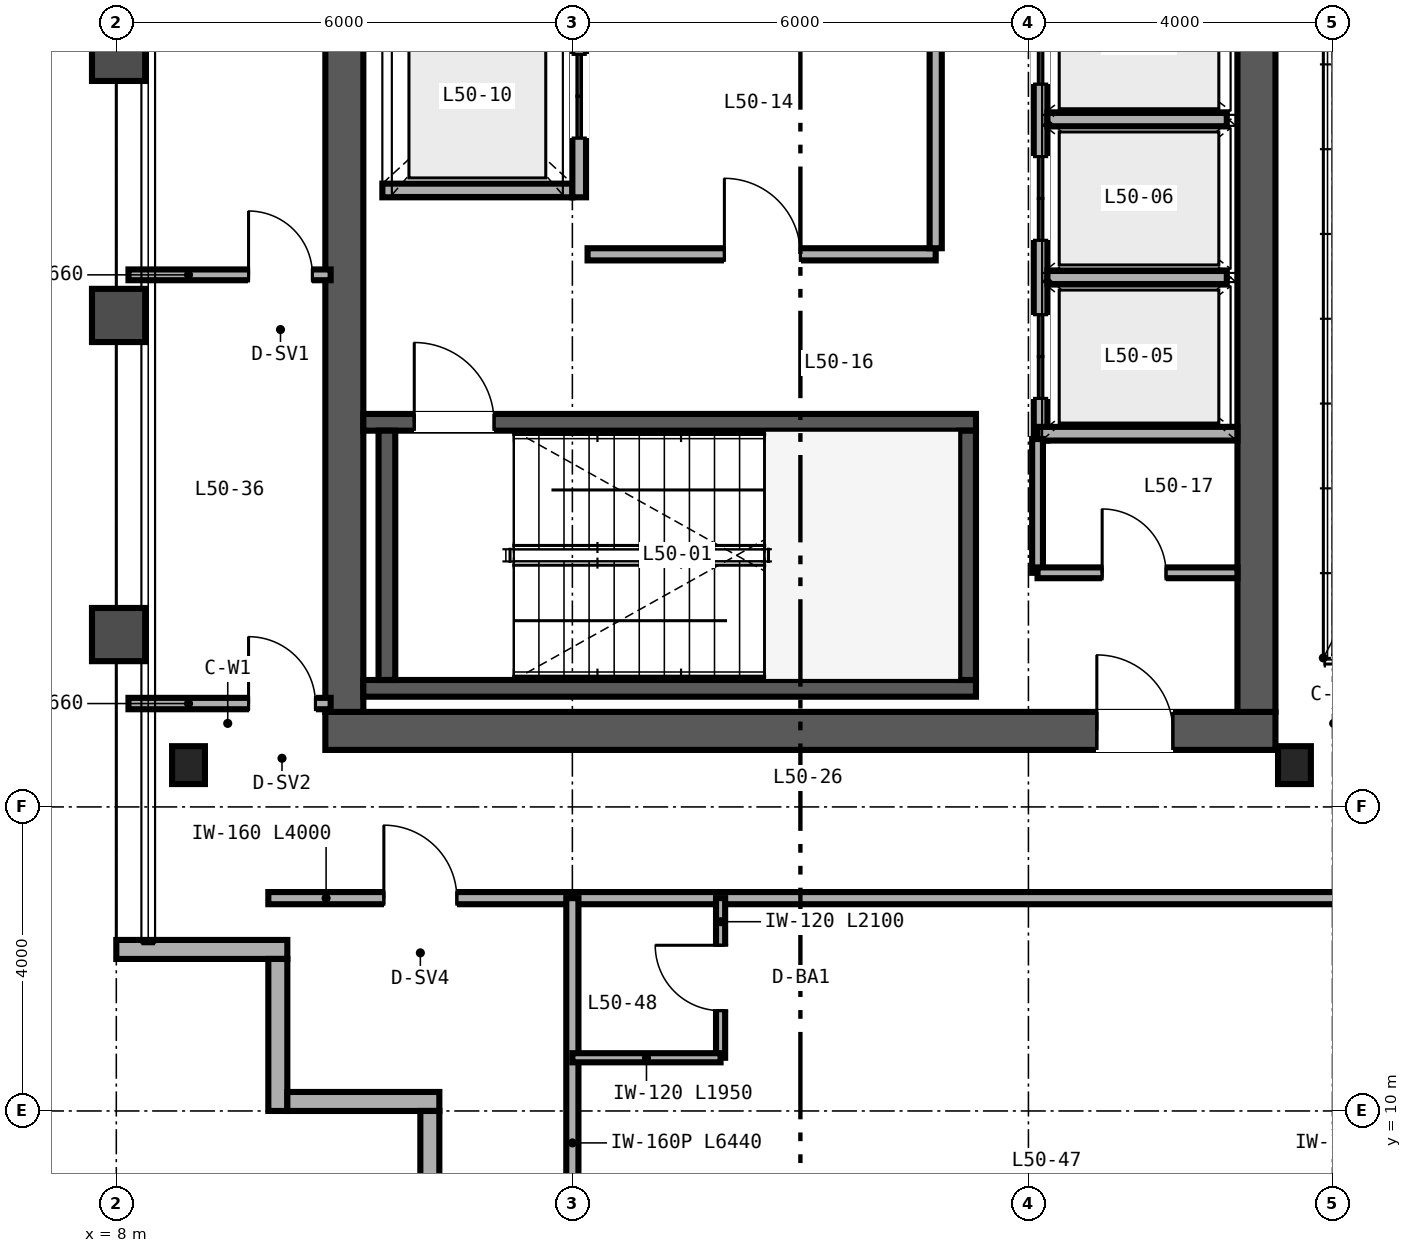
"""IFC4 building model, lengths in metres.
Left out: names, types, materials, properties, quantities, classifications, styles, units other than length and angle.
Written with IfcOpenShell. Run it as: python <this file> out.ifc"""

import sys

from ifc_helpers import new_model, si_unit, direction, frame, frame_2d, origin, origin_2d, place, context, subcontext, project, spatial, rectangle, i_section, extrude, source, transform, mapped, element, fill, save


model = new_model("IFC4")
c1 = context("Model", 3, precision=1e-05, world=origin(), true_north=direction((0.0, 1.0)))
c2 = subcontext(c1, "Body", "Model", "MODEL_VIEW")
j1 = project(units=[si_unit("LENGTHUNIT", "METRE"), si_unit("PLANEANGLEUNIT", "RADIAN")], contexts=[c1])
p1 = place(None, origin())
s1 = spatial("IfcSite", under=j1, at=p1, CompositionType="ELEMENT")
p2 = place(p1, origin())
s2 = spatial("IfcBuilding", under=s1, at=p2, CompositionType="ELEMENT")
p3 = place(p2, frame((0.0, 0.0, 199.2)))
s3 = spatial("IfcBuildingStorey", under=s2, at=p3, CompositionType="ELEMENT", Elevation=199.2)
p4 = place(p3, frame((10.75, 15.0, 0.0), z_axis=(0.0, 0.0, 1.0), x_axis=(1.0, 0.0, 0.0)))
e1 = element("IfcWall", 1, at=p4, inside=s3, PredefinedType="SHEAR", context=c2, shape_type="SweptSolid", body=[
    extrude(rectangle(XDim=12.5, YDim=0.5, at=frame_2d((6.25, 0.0))), origin(), (0.0, 0.0, 1.0), 3.37),
])
p5 = place(p4, frame((10.15, 0.0, 0.0)))
e2 = element("IfcOpeningElement", 2, at=p5, cuts=e1, PredefinedType="OPENING", context=c2, shape_type="SweptSolid", body=[
    extrude(rectangle(XDim=1.0, YDim=2.15, at=frame_2d((0.5, 1.075))), frame((0.0, 0.26, 0.0), z_axis=(0.0, -1.0, 0.0), x_axis=(1.0, 0.0, 0.0)), (0.0, 0.0, 1.0), 0.52),
])
for number, where, z_axis, x_axis in (
    (3, (11.0, 15.25, 0.0), (0.0, 0.0, 1.0), (0.0, 1.0, 0.0)),
    (4, (23.0, 15.25, 0.0), (0.0, 0.0, 1.0), (0.0, 1.0, 0.0)),
):
    element("IfcWall", number, at=place(p3, frame(where, z_axis=z_axis, x_axis=x_axis)), inside=s3, PredefinedType="SHEAR", context=c2, shape_type="SweptSolid", body=[
        extrude(rectangle(XDim=21.5, YDim=0.5, at=frame_2d((10.75, 0.0))), origin(), (0.0, 0.0, 1.0), 3.37),
    ])
p6 = place(p3, frame((11.25, 15.56, 0.0), z_axis=(0.0, 0.0, 1.0), x_axis=(1.0, 0.0, 0.0)))
e5 = element("IfcWall", 5, at=p6, inside=s3, PredefinedType="SHEAR", context=c2, shape_type="SweptSolid", body=[
    extrude(rectangle(XDim=8.06, YDim=0.22, at=frame_2d((4.03, 0.0))), origin(), (0.0, 0.0, 1.0), 3.4),
])
p7 = place(p3, frame((11.25, 19.06, 0.0), z_axis=(0.0, 0.0, 1.0), x_axis=(1.0, 0.0, 0.0)))
e6 = element("IfcWall", 6, at=p7, inside=s3, PredefinedType="SHEAR", context=c2, shape_type="SweptSolid", body=[
    extrude(rectangle(XDim=8.06, YDim=0.22, at=frame_2d((4.03, 0.0))), origin(), (0.0, 0.0, 1.0), 3.4),
])
p8 = place(p7, frame((0.67, 0.0, 0.0)))
e7 = element("IfcOpeningElement", 7, at=p8, cuts=e6, PredefinedType="OPENING", context=c2, shape_type="SweptSolid", body=[
    extrude(rectangle(XDim=1.05, YDim=2.15, at=frame_2d((0.525, 1.075))), frame((0.0, 0.12, 0.0), z_axis=(0.0, -1.0, 0.0), x_axis=(1.0, 0.0, 0.0)), (0.0, 0.0, 1.0), 0.24),
])
for number, where, z_axis, x_axis in (
    (8, (11.56, 15.67, 0.0), (0.0, 0.0, 1.0), (0.0, 1.0, 0.0)),
    (9, (19.2, 15.67, 0.0), (0.0, 0.0, 1.0), (0.0, 1.0, 0.0)),
):
    element("IfcWall", number, at=place(p3, frame(where, z_axis=z_axis, x_axis=x_axis)), inside=s3, PredefinedType="SHEAR", context=c2, shape_type="SweptSolid", body=[
        extrude(rectangle(XDim=3.28, YDim=0.22, at=frame_2d((1.64, 0.0))), origin(), (0.0, 0.0, 1.0), 3.4),
    ])
m1 = source(origin(), c2, "Body", "SweptSolid", [
    extrude(i_section(OverallWidth=0.432, OverallDepth=0.498, WebThickness=0.056, FlangeThickness=0.089, FilletRadius=0.025, at=origin_2d()), origin(), (0.0, 0.0, 1.0), 3.37),
])
for number, where, z_axis, x_axis in (
    (10, (8.95, 14.55, 0.0), (0.0, 0.0, 1.0), (1.0, 0.0, 0.0)),
    (11, (23.5, 14.55, 0.0), (0.0, 0.0, 1.0), (1.0, 0.0, 0.0)),
):
    element("IfcColumn", number, at=place(p3, frame(where, z_axis=z_axis, x_axis=x_axis)), inside=s3, PredefinedType="COLUMN", context=c2, shape_type="MappedRepresentation", body=[
        mapped(m1, transform((0.0, 0.0, 0.0), scale=1.0)),
    ])
p9 = place(p3, frame((8.0, 12.125, 0.0), z_axis=(0.0, 0.0, 1.0), x_axis=(1.0, 0.0, 0.0)))
e12 = element("IfcWall", 12, at=p9, inside=s3, PredefinedType="SOLIDWALL", context=c2, shape_type="SweptSolid", body=[
    extrude(rectangle(XDim=2.25, YDim=0.25, at=frame_2d((1.125, 0.0))), origin(), (0.0, 0.0, 1.0), 3.37),
])
for number, where, z_axis, x_axis in (
    (13, (10.125, 12.0, 0.0), (0.0, 0.0, 1.0), (0.0, -1.0, 0.0)),
    (14, (10.25, 10.125, 0.0), (0.0, 0.0, 1.0), (1.0, 0.0, 0.0)),
    (15, (12.125, 10.0, 0.0), (0.0, 0.0, 1.0), (0.0, -1.0, 0.0)),
):
    element("IfcWall", number, at=place(p3, frame(where, z_axis=z_axis, x_axis=x_axis)), inside=s3, PredefinedType="SOLIDWALL", context=c2, shape_type="SweptSolid", body=[
        extrude(rectangle(XDim=2.0, YDim=0.25, at=frame_2d((1.0, 0.0))), origin(), (0.0, 0.0, 1.0), 3.37),
    ])
p10 = place(p3, frame((20.16, 18.82, 0.0), z_axis=(0.0, 0.0, 1.0), x_axis=(0.0, 1.0, 0.0)))
e16 = element("IfcWall", 16, at=p10, inside=s3, PredefinedType="SOLIDWALL", context=c2, shape_type="SweptSolid", body=[
    extrude(rectangle(XDim=6.32, YDim=0.18, at=frame_2d((3.16, 0.0))), origin(), (0.0, 0.0, 1.0), 2.47),
])
p11 = place(p10, frame((0.555, 0.0, 0.0)))
e17 = element("IfcOpeningElement", 17, at=p11, cuts=e16, PredefinedType="OPENING", context=c2, shape_type="SweptSolid", body=[
    extrude(rectangle(XDim=1.1, YDim=2.2, at=frame_2d((0.55, 1.1))), frame((0.0, 0.1, 0.0), z_axis=(0.0, -1.0, 0.0), x_axis=(1.0, 0.0, 0.0)), (0.0, 0.0, 1.0), 0.2),
])
p12 = place(p10, frame((2.635, 0.0, 0.0)))
e18 = element("IfcOpeningElement", 18, at=p12, cuts=e16, PredefinedType="OPENING", context=c2, shape_type="SweptSolid", body=[
    extrude(rectangle(XDim=1.1, YDim=2.2, at=frame_2d((0.55, 1.1))), frame((0.0, 0.1, 0.0), z_axis=(0.0, -1.0, 0.0), x_axis=(1.0, 0.0, 0.0)), (0.0, 0.0, 1.0), 0.2),
])
p13 = place(p10, frame((4.69, 0.0, 0.0)))
e19 = element("IfcOpeningElement", 19, at=p13, cuts=e16, PredefinedType="OPENING", context=c2, shape_type="SweptSolid", body=[
    extrude(rectangle(XDim=1.1, YDim=2.2, at=frame_2d((0.55, 1.1))), frame((0.0, 0.1, 0.0), z_axis=(0.0, -1.0, 0.0), x_axis=(1.0, 0.0, 0.0)), (0.0, 0.0, 1.0), 0.2),
])
p14 = place(p3, frame((20.12, 18.91, 0.0), z_axis=(0.0, 0.0, 1.0), x_axis=(1.0, 0.0, 0.0)))
e20 = element("IfcWall", 20, at=p14, inside=s3, PredefinedType="SOLIDWALL", context=c2, shape_type="SweptSolid", body=[
    extrude(rectangle(XDim=2.63, YDim=0.18, at=frame_2d((1.315, 0.0))), origin(), (0.0, 0.0, 1.0), 3.37),
])
p15 = place(p3, frame((20.25, 20.965, 0.0), z_axis=(0.0, 0.0, 1.0), x_axis=(1.0, 0.0, 0.0)))
e21 = element("IfcWall", 21, at=p15, inside=s3, PredefinedType="SOLIDWALL", context=c2, shape_type="SweptSolid", body=[
    extrude(rectangle(XDim=2.36, YDim=0.18, at=frame_2d((1.18, 0.0))), origin(), (0.0, 0.0, 1.0), 2.47),
])
p16 = place(p3, frame((20.25, 23.045, 0.0), z_axis=(0.0, 0.0, 1.0), x_axis=(1.0, 0.0, 0.0)))
e22 = element("IfcWall", 22, at=p16, inside=s3, PredefinedType="SOLIDWALL", context=c2, shape_type="SweptSolid", body=[
    extrude(rectangle(XDim=2.36, YDim=0.18, at=frame_2d((1.18, 0.0))), origin(), (0.0, 0.0, 1.0), 3.37),
])
p17 = place(p3, frame((11.5, 22.11, 0.0), z_axis=(0.0, 0.0, 1.0), x_axis=(1.0, 0.0, 0.0)))
e23 = element("IfcWall", 23, at=p17, inside=s3, PredefinedType="SOLIDWALL", context=c2, shape_type="SweptSolid", body=[
    extrude(rectangle(XDim=2.5, YDim=0.18, at=frame_2d((1.25, 0.0))), origin(), (0.0, 0.0, 1.0), 3.37),
])
p18 = place(p3, frame((14.09, 22.02, 0.0), z_axis=(0.0, 0.0, 1.0), x_axis=(0.0, 1.0, 0.0)))
e24 = element("IfcWall", 24, at=p18, inside=s3, PredefinedType="SOLIDWALL", context=c2, shape_type="SweptSolid", body=[
    extrude(rectangle(XDim=2.66, YDim=0.18, at=frame_2d((1.33, 0.0))), origin(), (0.0, 0.0, 1.0), 3.37),
])
p19 = place(p18, frame((0.78, 0.0, 0.0)))
e25 = element("IfcOpeningElement", 25, at=p19, cuts=e24, PredefinedType="OPENING", context=c2, shape_type="SweptSolid", body=[
    extrude(rectangle(XDim=1.1, YDim=2.2, at=frame_2d((0.55, 1.1))), frame((0.0, 0.1, 0.0), z_axis=(0.0, -1.0, 0.0), x_axis=(1.0, 0.0, 0.0)), (0.0, 0.0, 1.0), 0.2),
])
p20 = place(p3, frame((14.2, 21.27, 0.0), z_axis=(0.0, 0.0, 1.0), x_axis=(1.0, 0.0, 0.0)))
e26 = element("IfcWall", 26, at=p20, inside=s3, PredefinedType="PARTITIONING", context=c2, shape_type="SweptSolid", body=[
    extrude(rectangle(XDim=4.58, YDim=0.16, at=frame_2d((2.29, 0.0))), origin(), (0.0, 0.0, 1.0), 3.37),
])
p21 = place(p20, frame((1.8, 0.0, 0.0)))
e27 = element("IfcOpeningElement", 27, at=p21, cuts=e26, PredefinedType="OPENING", context=c2, shape_type="SweptSolid", body=[
    extrude(rectangle(XDim=1.0, YDim=2.15, at=frame_2d((0.5, 1.075))), frame((0.0, 0.09, 0.0), z_axis=(0.0, -1.0, 0.0), x_axis=(1.0, 0.0, 0.0)), (0.0, 0.0, 1.0), 0.18),
])
p22 = place(p3, frame((18.78, 21.35, 0.0), z_axis=(0.0, 0.0, 1.0), x_axis=(0.0, 1.0, 0.0)))
e28 = element("IfcWall", 28, at=p22, inside=s3, PredefinedType="PARTITIONING", context=c2, shape_type="SweptSolid", body=[
    extrude(rectangle(XDim=3.81, YDim=0.16, at=frame_2d((1.905, 0.0))), origin(), (0.0, 0.0, 1.0), 3.37),
])
p23 = place(p3, frame((20.12, 17.08, 0.0), z_axis=(0.0, 0.0, 1.0), x_axis=(0.0, 1.0, 0.0)))
e29 = element("IfcWall", 29, at=p23, inside=s3, PredefinedType="PARTITIONING", context=c2, shape_type="SweptSolid", body=[
    extrude(rectangle(XDim=1.76, YDim=0.142, at=frame_2d((0.88, 0.0))), origin(), (0.0, 0.0, 1.0), 3.37),
])
p24 = place(p3, frame((20.12, 17.08, 0.0), z_axis=(0.0, 0.0, 1.0), x_axis=(1.0, 0.0, 0.0)))
e30 = element("IfcWall", 30, at=p24, inside=s3, PredefinedType="PARTITIONING", context=c2, shape_type="SweptSolid", body=[
    extrude(rectangle(XDim=2.63, YDim=0.142, at=frame_2d((1.315, 0.0))), origin(), (0.0, 0.0, 1.0), 3.37),
])
p25 = place(p24, frame((0.85, 0.0, 0.0)))
e31 = element("IfcOpeningElement", 31, at=p25, cuts=e30, PredefinedType="OPENING", context=c2, shape_type="SweptSolid", body=[
    extrude(rectangle(XDim=0.84, YDim=2.1, at=frame_2d((0.42, 1.05))), frame((0.0, 0.081, 0.0), z_axis=(0.0, -1.0, 0.0), x_axis=(1.0, 0.0, 0.0)), (0.0, 0.0, 1.0), 0.162),
])
p26 = place(p3, frame((8.16, 15.36, 0.0), z_axis=(0.0, 0.0, 1.0), x_axis=(1.0, 0.0, 0.0)))
e32 = element("IfcWall", 32, at=p26, inside=s3, PredefinedType="PARTITIONING", context=c2, shape_type="SweptSolid", body=[
    extrude(rectangle(XDim=2.66, YDim=0.15, at=frame_2d((1.33, 0.0))), origin(), (0.0, 0.0, 1.0), 2.591),
])
p27 = place(p26, frame((1.58, 0.0, 0.0)))
e33 = element("IfcOpeningElement", 33, at=p27, cuts=e32, PredefinedType="OPENING", context=c2, shape_type="SweptSolid", body=[
    extrude(rectangle(XDim=0.88, YDim=2.15, at=frame_2d((0.44, 1.075))), frame((0.0, 0.085, 0.0), z_axis=(0.0, -1.0, 0.0), x_axis=(1.0, 0.0, 0.0)), (0.0, 0.0, 1.0), 0.17),
])
p28 = place(p3, frame((8.16, 21.0, 0.0), z_axis=(0.0, 0.0, 1.0), x_axis=(1.0, 0.0, 0.0)))
e34 = element("IfcWall", 34, at=p28, inside=s3, PredefinedType="PARTITIONING", context=c2, shape_type="SweptSolid", body=[
    extrude(rectangle(XDim=2.66, YDim=0.142, at=frame_2d((1.33, 0.0))), origin(), (0.0, 0.0, 1.0), 2.47),
])
p29 = place(p28, frame((1.58, 0.0, 0.0)))
e35 = element("IfcOpeningElement", 35, at=p29, cuts=e34, PredefinedType="OPENING", context=c2, shape_type="SweptSolid", body=[
    extrude(rectangle(XDim=0.84, YDim=2.1, at=frame_2d((0.42, 1.05))), frame((0.0, 0.081, 0.0), z_axis=(0.0, -1.0, 0.0), x_axis=(1.0, 0.0, 0.0)), (0.0, 0.0, 1.0), 0.162),
])
p30 = place(p3, frame((10.0, 12.8, 0.0), z_axis=(0.0, 0.0, 1.0), x_axis=(1.0, 0.0, 0.0)))
e36 = element("IfcWall", 36, at=p30, inside=s3, PredefinedType="PARTITIONING", context=c2, shape_type="SweptSolid", body=[
    extrude(rectangle(XDim=4.0, YDim=0.16, at=frame_2d((2.0, 0.0))), origin(), (0.0, 0.0, 1.0), 3.37),
])
p31 = place(p30, frame((1.52, 0.0, 0.0)))
e37 = element("IfcOpeningElement", 37, at=p31, cuts=e36, PredefinedType="OPENING", context=c2, shape_type="SweptSolid", body=[
    extrude(rectangle(XDim=0.96, YDim=2.15, at=frame_2d((0.48, 1.075))), frame((0.0, 0.09, 0.0), z_axis=(0.0, -1.0, 0.0), x_axis=(1.0, 0.0, 0.0)), (0.0, 0.0, 1.0), 0.18),
])
p32 = place(p3, frame((14.0, 12.8, 0.0), z_axis=(0.0, 0.0, 1.0), x_axis=(1.0, 0.0, 0.0)))
e38 = element("IfcWall", 38, at=p32, inside=s3, PredefinedType="PARTITIONING", context=c2, shape_type="SweptSolid", body=[
    extrude(rectangle(XDim=12.0, YDim=0.16, at=frame_2d((6.0, 0.0))), origin(), (0.0, 0.0, 1.0), 2.913),
])
p33 = place(p32, frame((10.7, 0.0, 0.0)))
e39 = element("IfcOpeningElement", 39, at=p33, cuts=e38, PredefinedType="OPENING", context=c2, shape_type="SweptSolid", body=[
    extrude(rectangle(XDim=0.98, YDim=2.2, at=frame_2d((0.49, 1.1))), frame((0.0, 0.09, 0.0), z_axis=(0.0, -1.0, 0.0), x_axis=(1.0, 0.0, 0.0)), (0.0, 0.0, 1.0), 0.18),
])
p34 = place(p3, frame((14.0, 6.36, 0.0), z_axis=(0.0, 0.0, 1.0), x_axis=(0.0, 1.0, 0.0)))
e40 = element("IfcWall", 40, at=p34, inside=s3, PredefinedType="PARTITIONING", context=c2, shape_type="SweptSolid", body=[
    extrude(rectangle(XDim=6.44, YDim=0.16, at=frame_2d((3.22, 0.0))), origin(), (0.0, 0.0, 1.0), 2.677),
])
p35 = place(p3, frame((15.95, 10.7, 0.0), z_axis=(0.0, 0.0, 1.0), x_axis=(0.0, 1.0, 0.0)))
e41 = element("IfcWall", 41, at=p35, inside=s3, PredefinedType="PARTITIONING", context=c2, shape_type="SweptSolid", body=[
    extrude(rectangle(XDim=2.1, YDim=0.12, at=frame_2d((1.05, 0.0))), origin(), (0.0, 0.0, 1.0), 3.37),
])
p36 = place(p35, frame((0.62, 0.0, 0.0)))
e42 = element("IfcOpeningElement", 42, at=p36, cuts=e41, PredefinedType="OPENING", context=c2, shape_type="SweptSolid", body=[
    extrude(rectangle(XDim=0.86, YDim=2.1, at=frame_2d((0.43, 1.05))), frame((0.0, 0.07, 0.0), z_axis=(0.0, -1.0, 0.0), x_axis=(1.0, 0.0, 0.0)), (0.0, 0.0, 1.0), 0.14),
])
p37 = place(p3, frame((14.0, 10.7, 0.0), z_axis=(0.0, 0.0, 1.0), x_axis=(1.0, 0.0, 0.0)))
e43 = element("IfcWall", 43, at=p37, inside=s3, PredefinedType="PARTITIONING", context=c2, shape_type="SweptSolid", body=[
    extrude(rectangle(XDim=1.95, YDim=0.12, at=frame_2d((0.975, 0.0))), origin(), (0.0, 0.0, 1.0), 3.37),
])
m2 = source(origin(), c2, "Body", "SweptSolid", [
    extrude(rectangle(XDim=1.05, YDim=2.15, at=frame_2d((0.525, 1.075))), frame((0.0, 0.025, 0.0), z_axis=(0.0, -1.0, 0.0), x_axis=(1.0, 0.0, 0.0)), (0.0, 0.0, 1.0), 0.05),
])
p38 = place(p8, origin())
e44 = element("IfcDoor", 44, at=p38, inside=s3, OperationType="SINGLE_SWING_LEFT", PredefinedType="DOOR", context=c2, shape_type="MappedRepresentation", body=[
    mapped(m2, transform((0.0, 0.0, 0.0), scale=1.0)),
])
fill(e7, e44)
m3 = source(origin(), c2, "Body", "SweptSolid", [
    extrude(rectangle(XDim=1.1, YDim=2.2, at=frame_2d((0.55, 1.1))), frame((0.0, 0.025, 0.0), z_axis=(0.0, -1.0, 0.0), x_axis=(1.0, 0.0, 0.0)), (0.0, 0.0, 1.0), 0.05),
])
p39 = place(p11, origin())
e45 = element("IfcDoor", 45, at=p39, inside=s3, OperationType="DOUBLE_DOOR_SLIDING", PredefinedType="DOOR", context=c2, shape_type="MappedRepresentation", body=[
    mapped(m3, transform((0.0, 0.0, 0.0), scale=1.0)),
])
fill(e17, e45)
p40 = place(p12, origin())
e46 = element("IfcDoor", 46, at=p40, inside=s3, OperationType="DOUBLE_DOOR_SLIDING", PredefinedType="DOOR", context=c2, shape_type="MappedRepresentation", body=[
    mapped(m3, transform((0.0, 0.0, 0.0), scale=1.0)),
])
fill(e18, e46)
p41 = place(p13, origin())
e47 = element("IfcDoor", 47, at=p41, inside=s3, OperationType="DOUBLE_DOOR_SLIDING", PredefinedType="DOOR", context=c2, shape_type="MappedRepresentation", body=[
    mapped(m3, transform((0.0, 0.0, 0.0), scale=1.0)),
])
fill(e19, e47)
p42 = place(p19, origin())
e48 = element("IfcDoor", 48, at=p42, inside=s3, OperationType="DOUBLE_DOOR_SLIDING", PredefinedType="DOOR", context=c2, shape_type="MappedRepresentation", body=[
    mapped(m3, transform((0.0, 0.0, 0.0), scale=1.0)),
])
fill(e25, e48)
m4 = source(origin(), c2, "Body", "SweptSolid", [
    extrude(rectangle(XDim=1.0, YDim=2.15, at=frame_2d((0.5, 1.075))), frame((0.0, 0.025, 0.0), z_axis=(0.0, -1.0, 0.0), x_axis=(1.0, 0.0, 0.0)), (0.0, 0.0, 1.0), 0.05),
])
p43 = place(p21, origin())
e49 = element("IfcDoor", 49, at=p43, inside=s3, OperationType="SINGLE_SWING_LEFT", PredefinedType="DOOR", context=c2, shape_type="MappedRepresentation", body=[
    mapped(m4, transform((0.0, 0.0, 0.0), scale=1.0)),
])
fill(e27, e49)
m5 = source(origin(), c2, "Body", "SweptSolid", [
    extrude(rectangle(XDim=0.84, YDim=2.1, at=frame_2d((0.42, 1.05))), frame((0.0, 0.025, 0.0), z_axis=(0.0, -1.0, 0.0), x_axis=(1.0, 0.0, 0.0)), (0.0, 0.0, 1.0), 0.05),
])
p44 = place(p25, origin())
e50 = element("IfcDoor", 50, at=p44, inside=s3, OperationType="SINGLE_SWING_LEFT", PredefinedType="DOOR", context=c2, shape_type="MappedRepresentation", body=[
    mapped(m5, transform((0.0, 0.0, 0.0), scale=1.0)),
])
fill(e31, e50)
p45 = place(p5, origin())
e51 = element("IfcDoor", 51, at=p45, inside=s3, OperationType="SINGLE_SWING_LEFT", PredefinedType="DOOR", context=c2, shape_type="MappedRepresentation", body=[
    mapped(m4, transform((0.0, 0.0, 0.0), scale=1.0)),
])
fill(e2, e51)
m6 = source(origin(), c2, "Body", "SweptSolid", [
    extrude(rectangle(XDim=0.88, YDim=2.15, at=frame_2d((0.44, 1.075))), frame((0.0, 0.025, 0.0), z_axis=(0.0, -1.0, 0.0), x_axis=(1.0, 0.0, 0.0)), (0.0, 0.0, 1.0), 0.05),
])
p46 = place(p27, origin())
e52 = element("IfcDoor", 52, at=p46, inside=s3, OperationType="SINGLE_SWING_LEFT", PredefinedType="DOOR", context=c2, shape_type="MappedRepresentation", body=[
    mapped(m6, transform((0.0, 0.0, 0.0), scale=1.0)),
])
fill(e33, e52)
p47 = place(p29, origin())
e53 = element("IfcDoor", 53, at=p47, inside=s3, OperationType="SINGLE_SWING_LEFT", PredefinedType="DOOR", context=c2, shape_type="MappedRepresentation", body=[
    mapped(m5, transform((0.0, 0.0, 0.0), scale=1.0)),
])
fill(e35, e53)
m7 = source(origin(), c2, "Body", "SweptSolid", [
    extrude(rectangle(XDim=0.96, YDim=2.15, at=frame_2d((0.48, 1.075))), frame((0.0, 0.025, 0.0), z_axis=(0.0, -1.0, 0.0), x_axis=(1.0, 0.0, 0.0)), (0.0, 0.0, 1.0), 0.05),
])
p48 = place(p31, origin())
e54 = element("IfcDoor", 54, at=p48, inside=s3, OperationType="SINGLE_SWING_LEFT", PredefinedType="DOOR", context=c2, shape_type="MappedRepresentation", body=[
    mapped(m7, transform((0.0, 0.0, 0.0), scale=1.0)),
])
fill(e37, e54)
m8 = source(origin(), c2, "Body", "SweptSolid", [
    extrude(rectangle(XDim=0.86, YDim=2.1, at=frame_2d((0.43, 1.05))), frame((0.0, 0.025, 0.0), z_axis=(0.0, -1.0, 0.0), x_axis=(1.0, 0.0, 0.0)), (0.0, 0.0, 1.0), 0.05),
])
p49 = place(p36, origin())
e55 = element("IfcDoor", 55, at=p49, inside=s3, OperationType="SINGLE_SWING_RIGHT", PredefinedType="DOOR", context=c2, shape_type="MappedRepresentation", body=[
    mapped(m8, transform((0.0, 0.0, 0.0), scale=1.0)),
])
fill(e42, e55)
save(model, sys.argv[1])
